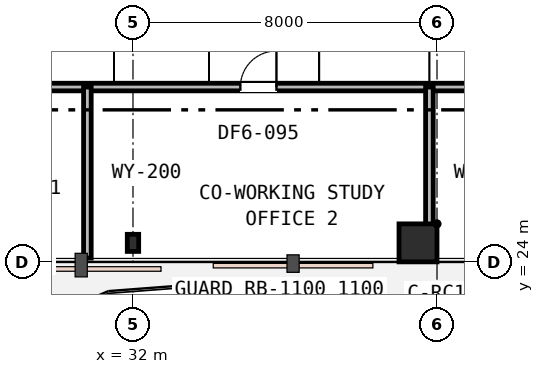
"""IFC4 building model, lengths in metres.
Left out: names, types, materials, properties, quantities, classifications, styles, units other than length and angle.
Written with IfcOpenShell. Run it as: python <this file> out.ifc"""

import sys

from ifc_helpers import new_model, si_unit, direction, frame, frame_2d, origin, origin_2d, place, context, subcontext, project, spatial, rectangle, i_section, extrude, element, fill, save


model = new_model("IFC4")
c1 = context("Model", 3, precision=1e-05, world=origin(), true_north=direction((0.0, 1.0)))
c2 = subcontext(c1, "Body", "Model", "MODEL_VIEW")
j1 = project(units=[si_unit("LENGTHUNIT", "METRE"), si_unit("PLANEANGLEUNIT", "RADIAN")], contexts=[c1])
p1 = place(None, origin())
s1 = spatial("IfcSite", under=j1, at=p1, CompositionType="ELEMENT")
p2 = place(p1, origin())
s2 = spatial("IfcBuilding", under=s1, at=p2, CompositionType="ELEMENT")
p3 = place(p2, frame((0.0, 0.0, 197.4)))
s3 = spatial("IfcBuildingStorey", under=s2, at=p3, CompositionType="ELEMENT", Elevation=197.4)
p4 = place(p3, frame((32.0, 24.5, 0.0), z_axis=(0.0, 0.0, 1.0), x_axis=(1.0, 0.0, 0.0)))
e1 = element("IfcColumn", 1, at=p4, inside=s3, PredefinedType="COLUMN", context=c2, shape_type="SweptSolid", body=[
    extrude(i_section(OverallWidth=0.3, OverallDepth=0.45, WebThickness=0.014, FlangeThickness=0.026, FilletRadius=0.027, at=origin_2d()), origin(), (0.0, 0.0, 1.0), 3.6),
])
p5 = place(p3, frame((39.5, 24.5, 0.0), z_axis=(0.0, 0.0, 1.0), x_axis=(1.0, 0.0, 0.0)))
e2 = element("IfcColumn", 2, at=p5, inside=s3, PredefinedType="COLUMN", context=c2, shape_type="SweptSolid", body=[
    extrude(rectangle(XDim=1.0, YDim=1.0, at=origin_2d()), origin(), (0.0, 0.0, 1.0), 3.6),
])
p6 = place(p3, frame((15.4, 28.6, 0.0), z_axis=(0.0, 0.0, 1.0), x_axis=(1.0, 0.0, 0.0)))
e3 = element("IfcWall", 3, at=p6, inside=s3, PredefinedType="PARTITIONING", context=c2, shape_type="SweptSolid", body=[
    extrude(rectangle(XDim=35.5, YDim=0.2, at=frame_2d((17.75, 0.0))), origin(), (0.0, 0.0, 1.0), 2.92),
])
p7 = place(p6, frame((11.525, 0.0, 0.0)))
e4 = element("IfcOpeningElement", 4, at=p7, cuts=e3, PredefinedType="OPENING", context=c2, shape_type="SweptSolid", body=[
    extrude(rectangle(XDim=0.95, YDim=2.15, at=frame_2d((0.475, 1.075))), frame((0.0, 0.11, 0.0), z_axis=(0.0, -1.0, 0.0), x_axis=(1.0, 0.0, 0.0)), (0.0, 0.0, 1.0), 0.22),
])
p8 = place(p6, frame((19.425, 0.0, 0.0)))
e5 = element("IfcOpeningElement", 5, at=p8, cuts=e3, PredefinedType="OPENING", context=c2, shape_type="SweptSolid", body=[
    extrude(rectangle(XDim=0.95, YDim=2.15, at=frame_2d((0.475, 1.075))), frame((0.0, 0.11, 0.0), z_axis=(0.0, -1.0, 0.0), x_axis=(1.0, 0.0, 0.0)), (0.0, 0.0, 1.0), 0.22),
])
p9 = place(p6, frame((26.275, 0.0, 0.0)))
e6 = element("IfcOpeningElement", 6, at=p9, cuts=e3, PredefinedType="OPENING", context=c2, shape_type="SweptSolid", body=[
    extrude(rectangle(XDim=0.95, YDim=2.15, at=frame_2d((0.475, 1.075))), frame((0.0, 0.11, 0.0), z_axis=(0.0, -1.0, 0.0), x_axis=(1.0, 0.0, 0.0)), (0.0, 0.0, 1.0), 0.22),
])
p10 = place(p3, frame((30.8, 24.1, 0.0), z_axis=(0.0, 0.0, 1.0), x_axis=(0.0, 1.0, 0.0)))
e7 = element("IfcWall", 7, at=p10, inside=s3, PredefinedType="PARTITIONING", context=c2, shape_type="SweptSolid", body=[
    extrude(rectangle(XDim=4.5, YDim=0.2, at=frame_2d((2.25, 0.0))), origin(), (0.0, 0.0, 1.0), 3.02),
])
p11 = place(p3, frame((39.8, 24.1, 0.0), z_axis=(0.0, 0.0, 1.0), x_axis=(0.0, 1.0, 0.0)))
e8 = element("IfcWall", 8, at=p11, inside=s3, PredefinedType="PARTITIONING", context=c2, shape_type="SweptSolid", body=[
    extrude(rectangle(XDim=4.5, YDim=0.2, at=frame_2d((2.25, 0.0))), origin(), (0.0, 0.0, 1.0), 2.92),
])
p12 = place(p8, origin())
e9 = element("IfcDoor", 9, at=p12, inside=s3, OperationType="SINGLE_SWING_RIGHT", PredefinedType="DOOR", context=c2, shape_type="SweptSolid", body=[
    extrude(rectangle(XDim=0.95, YDim=2.15, at=frame_2d((0.475, 1.075))), frame((0.0, 0.025, 0.0), z_axis=(0.0, -1.0, 0.0), x_axis=(1.0, 0.0, 0.0)), (0.0, 0.0, 1.0), 0.05),
])
fill(e5, e9)
save(model, sys.argv[1])
